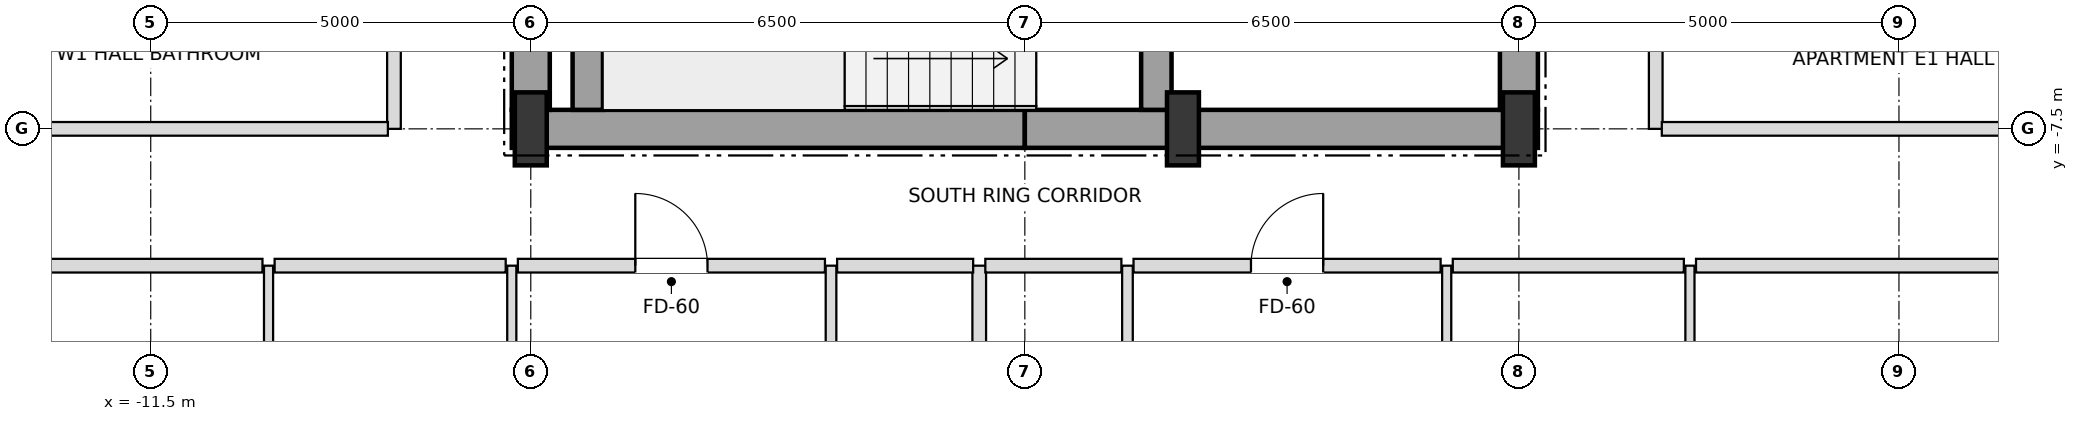
"""IFC4 building model, lengths in metres.
Left out: names, types, materials, properties, quantities, classifications, styles, units other than length and angle.
Written with IfcOpenShell. Run it as: python <this file> out.ifc"""

import sys

from ifc_helpers import new_model, si_unit, direction, frame, frame_2d, origin, origin_2d, place, context, subcontext, project, spatial, rectangle, i_section, extrude, element, fill, save


model = new_model("IFC4")
c1 = context("Model", 3, precision=1e-05, world=origin(), true_north=direction((0.0, 1.0)))
c2 = subcontext(c1, "Body", "Model", "MODEL_VIEW")
j1 = project(units=[si_unit("LENGTHUNIT", "METRE"), si_unit("PLANEANGLEUNIT", "RADIAN")], contexts=[c1])
p1 = place(None, origin())
s1 = spatial("IfcSite", under=j1, at=p1, CompositionType="ELEMENT")
p2 = place(p1, origin())
s2 = spatial("IfcBuilding", under=s1, at=p2, CompositionType="ELEMENT")
p3 = place(p2, frame((0.0, 0.0, 72.0)))
s3 = spatial("IfcBuildingStorey", under=s2, at=p3, CompositionType="ELEMENT", Elevation=72.0)
for number, where, z_axis, x_axis in (
    (1, (-6.5, -7.5, 0.0), (0.0, 0.0, 1.0), (1.0, 0.0, 0.0)),
    (2, (2.08, -7.5, 0.0), (0.0, 0.0, 1.0), (1.0, 0.0, 0.0)),
    (3, (6.5, -7.5, 0.0), (0.0, 0.0, 1.0), (1.0, 0.0, 0.0)),
):
    element("IfcColumn", number, at=place(p3, frame(where, z_axis=z_axis, x_axis=x_axis)), inside=s3, PredefinedType="COLUMN", context=c2, shape_type="SweptSolid", body=[
        extrude(i_section(OverallWidth=0.42, OverallDepth=0.96, WebThickness=0.022, FlangeThickness=0.034, at=origin_2d()), origin(), (0.0, 0.0, 1.0), 3.6),
    ])
for number, where, z_axis, x_axis in (
    (4, (-6.75, -7.5, 0.0), (0.0, 0.0, 1.0), (1.0, 0.0, 0.0)),
    (5, (0.0, -7.5, 0.0), (0.0, 0.0, 1.0), (1.0, 0.0, 0.0)),
):
    element("IfcWall", number, at=place(p3, frame(where, z_axis=z_axis, x_axis=x_axis)), inside=s3, PredefinedType="SHEAR", context=c2, shape_type="SweptSolid", body=[
        extrude(rectangle(XDim=6.75, YDim=0.5, at=frame_2d((3.375, 0.0))), origin(), (0.0, 0.0, 1.0), 3.38),
    ])
p4 = place(p3, frame((-6.5, -7.25, 0.0), z_axis=(0.0, 0.0, 1.0), x_axis=(0.0, 1.0, 0.0)))
e6 = element("IfcWall", 6, at=p4, inside=s3, PredefinedType="SHEAR", context=c2, shape_type="SweptSolid", body=[
    extrude(rectangle(XDim=3.55, YDim=0.5, at=frame_2d((1.775, 0.0))), origin(), (0.0, 0.0, 1.0), 3.38),
])
p5 = place(p3, frame((6.5, -7.25, 0.0), z_axis=(0.0, 0.0, 1.0), x_axis=(0.0, 1.0, 0.0)))
e7 = element("IfcWall", 7, at=p5, inside=s3, PredefinedType="SHEAR", context=c2, shape_type="SweptSolid", body=[
    extrude(rectangle(XDim=5.75, YDim=0.5, at=frame_2d((2.875, 0.0))), origin(), (0.0, 0.0, 1.0), 3.38),
])
p6 = place(p5, frame((0.85, 0.0, 0.0)))
e8 = element("IfcOpeningElement", 8, at=p6, cuts=e7, PredefinedType="OPENING", context=c2, shape_type="SweptSolid", body=[
    extrude(rectangle(XDim=1.05, YDim=2.15, at=frame_2d((0.525, 1.075))), frame((0.0, 0.26, 0.0), z_axis=(0.0, -1.0, 0.0), x_axis=(1.0, 0.0, 0.0)), (0.0, 0.0, 1.0), 0.52),
])
p7 = place(p3, frame((-5.75, -7.25, 0.0), z_axis=(0.0, 0.0, 1.0), x_axis=(0.0, 1.0, 0.0)))
e9 = element("IfcWall", 9, at=p7, inside=s3, PredefinedType="SHEAR", context=c2, shape_type="SweptSolid", body=[
    extrude(rectangle(XDim=2.9, YDim=0.4, at=frame_2d((1.45, 0.0))), origin(), (0.0, 0.0, 1.0), 3.38),
])
p8 = place(p3, frame((1.73, -7.25, 0.0), z_axis=(0.0, 0.0, 1.0), x_axis=(0.0, 1.0, 0.0)))
e10 = element("IfcWall", 10, at=p8, inside=s3, PredefinedType="SHEAR", context=c2, shape_type="SweptSolid", body=[
    extrude(rectangle(XDim=3.3, YDim=0.4, at=frame_2d((1.65, 0.0))), origin(), (0.0, 0.0, 1.0), 3.38),
])
p9 = place(p8, frame((0.9, 0.0, 0.0)))
e11 = element("IfcOpeningElement", 11, at=p9, cuts=e10, PredefinedType="OPENING", context=c2, shape_type="SweptSolid", body=[
    extrude(rectangle(XDim=1.05, YDim=2.15, at=frame_2d((0.525, 1.075))), frame((0.0, 0.21, 0.0), z_axis=(0.0, -1.0, 0.0), x_axis=(1.0, 0.0, 0.0)), (0.0, 0.0, 1.0), 0.42),
])
p10 = place(p3, frame((-9.95, -18.9, 0.0), z_axis=(0.0, 0.0, 1.0), x_axis=(0.0, 1.0, 0.0)))
e12 = element("IfcWall", 12, at=p10, inside=s3, PredefinedType="PARTITIONING", context=c2, shape_type="SweptSolid", body=[
    extrude(rectangle(XDim=9.6, YDim=0.12, at=frame_2d((4.8, 0.0))), origin(), (0.0, 0.0, 1.0), 2.816),
])
p11 = place(p10, frame((4.35, 0.0, 0.0)))
e13 = element("IfcOpeningElement", 13, at=p11, cuts=e12, PredefinedType="OPENING", context=c2, shape_type="SweptSolid", body=[
    extrude(rectangle(XDim=0.9, YDim=2.1, at=frame_2d((0.45, 1.05))), frame((0.0, 0.07, 0.0), z_axis=(0.0, -1.0, 0.0), x_axis=(1.0, 0.0, 0.0)), (0.0, 0.0, 1.0), 0.14),
])
p12 = place(p3, frame((-8.3, -7.5, 0.0), z_axis=(0.0, 0.0, 1.0), x_axis=(0.0, 1.0, 0.0)))
e14 = element("IfcWall", 14, at=p12, inside=s3, PredefinedType="PARTITIONING", context=c2, shape_type="SweptSolid", body=[
    extrude(rectangle(XDim=15.0, YDim=0.18, at=frame_2d((7.5, 0.0))), origin(), (0.0, 0.0, 1.0), 3.38),
])
p13 = place(p12, frame((3.475, 0.0, 0.0)))
e15 = element("IfcOpeningElement", 15, at=p13, cuts=e14, PredefinedType="OPENING", context=c2, shape_type="SweptSolid", body=[
    extrude(rectangle(XDim=0.95, YDim=2.15, at=frame_2d((0.475, 1.075))), frame((0.0, 0.1, 0.0), z_axis=(0.0, -1.0, 0.0), x_axis=(1.0, 0.0, 0.0)), (0.0, 0.0, 1.0), 0.2),
])
p14 = place(p3, frame((-6.75, -24.9, 0.0), z_axis=(0.0, 0.0, 1.0), x_axis=(0.0, 1.0, 0.0)))
e16 = element("IfcWall", 16, at=p14, inside=s3, PredefinedType="PARTITIONING", context=c2, shape_type="SweptSolid", body=[
    extrude(rectangle(XDim=15.6, YDim=0.12, at=frame_2d((7.8, 0.0))), origin(), (0.0, 0.0, 1.0), 2.816),
])
p15 = place(p14, frame((10.325, 0.0, 0.0)))
e17 = element("IfcOpeningElement", 17, at=p15, cuts=e16, PredefinedType="OPENING", context=c2, shape_type="SweptSolid", body=[
    extrude(rectangle(XDim=0.95, YDim=2.1, at=frame_2d((0.475, 1.05))), frame((0.0, 0.07, 0.0), z_axis=(0.0, -1.0, 0.0), x_axis=(1.0, 0.0, 0.0)), (0.0, 0.0, 1.0), 0.14),
])
p16 = place(p14, frame((2.55, 0.0, 0.0)))
e18 = element("IfcOpeningElement", 18, at=p16, cuts=e16, PredefinedType="OPENING", context=c2, shape_type="SweptSolid", body=[
    extrude(rectangle(XDim=0.9, YDim=2.1, at=frame_2d((0.45, 1.05))), frame((0.0, 0.07, 0.0), z_axis=(0.0, -1.0, 0.0), x_axis=(1.0, 0.0, 0.0)), (0.0, 0.0, 1.0), 0.14),
])
p17 = place(p3, frame((-2.55, -18.9, 0.0), z_axis=(0.0, 0.0, 1.0), x_axis=(0.0, 1.0, 0.0)))
e19 = element("IfcWall", 19, at=p17, inside=s3, PredefinedType="PARTITIONING", context=c2, shape_type="SweptSolid", body=[
    extrude(rectangle(XDim=9.6, YDim=0.14, at=frame_2d((4.8, 0.0))), origin(), (0.0, 0.0, 1.0), 2.948),
])
p18 = place(p17, frame((4.35, 0.0, 0.0)))
e20 = element("IfcOpeningElement", 20, at=p18, cuts=e19, PredefinedType="OPENING", context=c2, shape_type="SweptSolid", body=[
    extrude(rectangle(XDim=0.9, YDim=2.1, at=frame_2d((0.45, 1.05))), frame((0.0, 0.08, 0.0), z_axis=(0.0, -1.0, 0.0), x_axis=(1.0, 0.0, 0.0)), (0.0, 0.0, 1.0), 0.16),
])
p19 = place(p3, frame((-0.6, -24.9, 0.0), z_axis=(0.0, 0.0, 1.0), x_axis=(0.0, 1.0, 0.0)))
e21 = element("IfcWall", 21, at=p19, inside=s3, PredefinedType="PARTITIONING", context=c2, shape_type="SweptSolid", body=[
    extrude(rectangle(XDim=15.6, YDim=0.18, at=frame_2d((7.8, 0.0))), origin(), (0.0, 0.0, 1.0), 2.816),
])
p20 = place(p3, frame((1.35, -18.9, 0.0), z_axis=(0.0, 0.0, 1.0), x_axis=(0.0, 1.0, 0.0)))
e22 = element("IfcWall", 22, at=p20, inside=s3, PredefinedType="PARTITIONING", context=c2, shape_type="SweptSolid", body=[
    extrude(rectangle(XDim=9.6, YDim=0.14, at=frame_2d((4.8, 0.0))), origin(), (0.0, 0.0, 1.0), 2.948),
])
p21 = place(p20, frame((4.35, 0.0, 0.0)))
e23 = element("IfcOpeningElement", 23, at=p21, cuts=e22, PredefinedType="OPENING", context=c2, shape_type="SweptSolid", body=[
    extrude(rectangle(XDim=0.9, YDim=2.1, at=frame_2d((0.45, 1.05))), frame((0.0, 0.08, 0.0), z_axis=(0.0, -1.0, 0.0), x_axis=(1.0, 0.0, 0.0)), (0.0, 0.0, 1.0), 0.16),
])
p22 = place(p3, frame((5.55, -24.9, 0.0), z_axis=(0.0, 0.0, 1.0), x_axis=(0.0, 1.0, 0.0)))
e24 = element("IfcWall", 24, at=p22, inside=s3, PredefinedType="PARTITIONING", context=c2, shape_type="SweptSolid", body=[
    extrude(rectangle(XDim=15.6, YDim=0.12, at=frame_2d((7.8, 0.0))), origin(), (0.0, 0.0, 1.0), 2.816),
])
p23 = place(p22, frame((10.325, 0.0, 0.0)))
e25 = element("IfcOpeningElement", 25, at=p23, cuts=e24, PredefinedType="OPENING", context=c2, shape_type="SweptSolid", body=[
    extrude(rectangle(XDim=0.95, YDim=2.1, at=frame_2d((0.475, 1.05))), frame((0.0, 0.07, 0.0), z_axis=(0.0, -1.0, 0.0), x_axis=(1.0, 0.0, 0.0)), (0.0, 0.0, 1.0), 0.14),
])
p24 = place(p22, frame((2.55, 0.0, 0.0)))
e26 = element("IfcOpeningElement", 26, at=p24, cuts=e24, PredefinedType="OPENING", context=c2, shape_type="SweptSolid", body=[
    extrude(rectangle(XDim=0.9, YDim=2.1, at=frame_2d((0.45, 1.05))), frame((0.0, 0.07, 0.0), z_axis=(0.0, -1.0, 0.0), x_axis=(1.0, 0.0, 0.0)), (0.0, 0.0, 1.0), 0.14),
])
p25 = place(p3, frame((8.3, -7.5, 0.0), z_axis=(0.0, 0.0, 1.0), x_axis=(0.0, 1.0, 0.0)))
e27 = element("IfcWall", 27, at=p25, inside=s3, PredefinedType="PARTITIONING", context=c2, shape_type="SweptSolid", body=[
    extrude(rectangle(XDim=15.0, YDim=0.18, at=frame_2d((7.5, 0.0))), origin(), (0.0, 0.0, 1.0), 3.38),
])
p26 = place(p25, frame((3.305, 0.0, 0.0)))
e28 = element("IfcOpeningElement", 28, at=p26, cuts=e27, PredefinedType="OPENING", context=c2, shape_type="SweptSolid", body=[
    extrude(rectangle(XDim=0.95, YDim=2.15, at=frame_2d((0.475, 1.075))), frame((0.0, 0.1, 0.0), z_axis=(0.0, -1.0, 0.0), x_axis=(1.0, 0.0, 0.0)), (0.0, 0.0, 1.0), 0.2),
])
p27 = place(p25, frame((10.805, 0.0, 0.0)))
e29 = element("IfcOpeningElement", 29, at=p27, cuts=e27, PredefinedType="OPENING", context=c2, shape_type="SweptSolid", body=[
    extrude(rectangle(XDim=0.95, YDim=2.15, at=frame_2d((0.475, 1.075))), frame((0.0, 0.1, 0.0), z_axis=(0.0, -1.0, 0.0), x_axis=(1.0, 0.0, 0.0)), (0.0, 0.0, 1.0), 0.2),
])
p28 = place(p3, frame((8.75, -24.9, 0.0), z_axis=(0.0, 0.0, 1.0), x_axis=(0.0, 1.0, 0.0)))
e30 = element("IfcWall", 30, at=p28, inside=s3, PredefinedType="PARTITIONING", context=c2, shape_type="SweptSolid", body=[
    extrude(rectangle(XDim=15.6, YDim=0.12, at=frame_2d((7.8, 0.0))), origin(), (0.0, 0.0, 1.0), 2.816),
])
p29 = place(p28, frame((10.325, 0.0, 0.0)))
e31 = element("IfcOpeningElement", 31, at=p29, cuts=e30, PredefinedType="OPENING", context=c2, shape_type="SweptSolid", body=[
    extrude(rectangle(XDim=0.95, YDim=2.1, at=frame_2d((0.475, 1.05))), frame((0.0, 0.07, 0.0), z_axis=(0.0, -1.0, 0.0), x_axis=(1.0, 0.0, 0.0)), (0.0, 0.0, 1.0), 0.14),
])
p30 = place(p28, frame((2.55, 0.0, 0.0)))
e32 = element("IfcOpeningElement", 32, at=p30, cuts=e30, PredefinedType="OPENING", context=c2, shape_type="SweptSolid", body=[
    extrude(rectangle(XDim=0.9, YDim=2.1, at=frame_2d((0.45, 1.05))), frame((0.0, 0.07, 0.0), z_axis=(0.0, -1.0, 0.0), x_axis=(1.0, 0.0, 0.0)), (0.0, 0.0, 1.0), 0.14),
])
p31 = place(p3, frame((-18.32, -9.3, 0.0), z_axis=(0.0, 0.0, 1.0), x_axis=(1.0, 0.0, 0.0)))
e33 = element("IfcWall", 33, at=p31, inside=s3, PredefinedType="PARTITIONING", context=c2, shape_type="SweptSolid", body=[
    extrude(rectangle(XDim=8.29, YDim=0.18, at=frame_2d((4.145, 0.0))), origin(), (0.0, 0.0, 1.0), 2.816),
])
p32 = place(p3, frame((-9.87, -9.3, 0.0), z_axis=(0.0, 0.0, 1.0), x_axis=(1.0, 0.0, 0.0)))
e34 = element("IfcWall", 34, at=p32, inside=s3, PredefinedType="PARTITIONING", context=c2, shape_type="SweptSolid", body=[
    extrude(rectangle(XDim=3.04, YDim=0.18, at=frame_2d((1.52, 0.0))), origin(), (0.0, 0.0, 1.0), 3.38),
])
p33 = place(p3, frame((-6.67, -9.3, 0.0), z_axis=(0.0, 0.0, 1.0), x_axis=(1.0, 0.0, 0.0)))
e35 = element("IfcWall", 35, at=p33, inside=s3, PredefinedType="PARTITIONING", context=c2, shape_type="SweptSolid", body=[
    extrude(rectangle(XDim=4.04, YDim=0.18, at=frame_2d((2.02, 0.0))), origin(), (0.0, 0.0, 1.0), 2.816),
])
p34 = place(p33, frame((1.545, 0.0, 0.0)))
e36 = element("IfcOpeningElement", 36, at=p34, cuts=e35, PredefinedType="OPENING", context=c2, shape_type="SweptSolid", body=[
    extrude(rectangle(XDim=0.95, YDim=2.15, at=frame_2d((0.475, 1.075))), frame((0.0, 0.1, 0.0), z_axis=(0.0, -1.0, 0.0), x_axis=(1.0, 0.0, 0.0)), (0.0, 0.0, 1.0), 0.2),
])
for number, where, z_axis, x_axis in (
    (37, (-2.47, -9.3, 0.0), (0.0, 0.0, 1.0), (1.0, 0.0, 0.0)),
    (38, (-0.52, -9.3, 0.0), (0.0, 0.0, 1.0), (1.0, 0.0, 0.0)),
):
    element("IfcWall", number, at=place(p3, frame(where, z_axis=z_axis, x_axis=x_axis)), inside=s3, PredefinedType="PARTITIONING", context=c2, shape_type="SweptSolid", body=[
        extrude(rectangle(XDim=1.79, YDim=0.18, at=frame_2d((0.895, 0.0))), origin(), (0.0, 0.0, 1.0), 3.38),
    ])
p35 = place(p3, frame((1.43, -9.3, 0.0), z_axis=(0.0, 0.0, 1.0), x_axis=(1.0, 0.0, 0.0)))
e39 = element("IfcWall", 39, at=p35, inside=s3, PredefinedType="PARTITIONING", context=c2, shape_type="SweptSolid", body=[
    extrude(rectangle(XDim=4.04, YDim=0.18, at=frame_2d((2.02, 0.0))), origin(), (0.0, 0.0, 1.0), 3.38),
])
p36 = place(p35, frame((1.545, 0.0, 0.0)))
e40 = element("IfcOpeningElement", 40, at=p36, cuts=e39, PredefinedType="OPENING", context=c2, shape_type="SweptSolid", body=[
    extrude(rectangle(XDim=0.95, YDim=2.15, at=frame_2d((0.475, 1.075))), frame((0.0, 0.1, 0.0), z_axis=(0.0, -1.0, 0.0), x_axis=(1.0, 0.0, 0.0)), (0.0, 0.0, 1.0), 0.2),
])
p37 = place(p3, frame((5.63, -9.3, 0.0), z_axis=(0.0, 0.0, 1.0), x_axis=(1.0, 0.0, 0.0)))
e41 = element("IfcWall", 41, at=p37, inside=s3, PredefinedType="PARTITIONING", context=c2, shape_type="SweptSolid", body=[
    extrude(rectangle(XDim=3.04, YDim=0.18, at=frame_2d((1.52, 0.0))), origin(), (0.0, 0.0, 1.0), 2.816),
])
p38 = place(p3, frame((8.83, -9.3, 0.0), z_axis=(0.0, 0.0, 1.0), x_axis=(1.0, 0.0, 0.0)))
e42 = element("IfcWall", 42, at=p38, inside=s3, PredefinedType="PARTITIONING", context=c2, shape_type="SweptSolid", body=[
    extrude(rectangle(XDim=9.49, YDim=0.18, at=frame_2d((4.745, 0.0))), origin(), (0.0, 0.0, 1.0), 2.816),
])
for number, where, z_axis, x_axis in (
    (43, (-16.02, -7.5, 0.0), (0.0, 0.0, 1.0), (1.0, 0.0, 0.0)),
    (44, (8.38, -7.5, 0.0), (0.0, 0.0, 1.0), (1.0, 0.0, 0.0)),
):
    element("IfcWall", number, at=place(p3, frame(where, z_axis=z_axis, x_axis=x_axis)), inside=s3, PredefinedType="PARTITIONING", context=c2, shape_type="SweptSolid", body=[
        extrude(rectangle(XDim=7.64, YDim=0.18, at=frame_2d((3.82, 0.0))), origin(), (0.0, 0.0, 1.0), 2.816),
    ])
p39 = place(p34, origin())
e45 = element("IfcDoor", 45, at=p39, inside=s3, OperationType="SINGLE_SWING_LEFT", PredefinedType="DOOR", context=c2, shape_type="SweptSolid", body=[
    extrude(rectangle(XDim=0.95, YDim=2.15, at=frame_2d((0.475, 1.075))), frame((0.0, 0.025, 0.0), z_axis=(0.0, -1.0, 0.0), x_axis=(1.0, 0.0, 0.0)), (0.0, 0.0, 1.0), 0.05),
])
fill(e36, e45)
p40 = place(p36, origin())
e46 = element("IfcDoor", 46, at=p40, inside=s3, OperationType="SINGLE_SWING_RIGHT", PredefinedType="DOOR", context=c2, shape_type="SweptSolid", body=[
    extrude(rectangle(XDim=0.95, YDim=2.15, at=frame_2d((0.475, 1.075))), frame((0.0, 0.025, 0.0), z_axis=(0.0, -1.0, 0.0), x_axis=(1.0, 0.0, 0.0)), (0.0, 0.0, 1.0), 0.05),
])
fill(e40, e46)
save(model, sys.argv[1])
